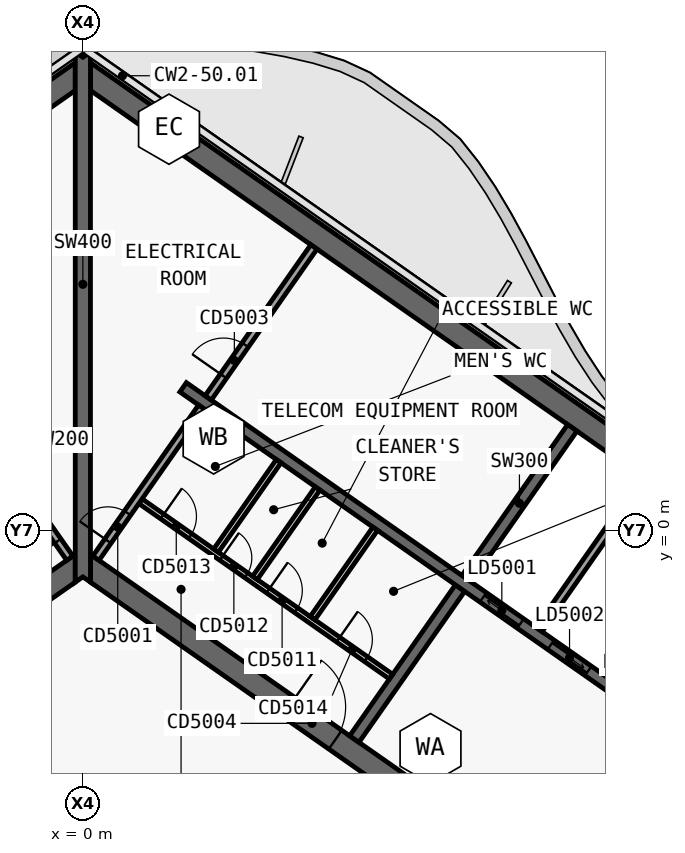
"""IFC4 building model, lengths in metres.
Left out: names, types, materials, properties, quantities, classifications, styles, units other than length and angle.
Written with IfcOpenShell. Run it as: python <this file> out.ifc"""

import sys

from ifc_helpers import new_model, si_unit, direction, frame, frame_2d, origin, place, context, subcontext, project, spatial, polyline, rectangle, outline, extrude, element, fill, save


model = new_model("IFC4")
c1 = context("Model", 3, precision=1e-05, world=origin(), true_north=direction((0.0, 1.0)))
c2 = subcontext(c1, "Body", "Model", "MODEL_VIEW")
j1 = project(units=[si_unit("LENGTHUNIT", "METRE"), si_unit("PLANEANGLEUNIT", "RADIAN")], contexts=[c1])
p1 = place(None, origin())
s1 = spatial("IfcSite", under=j1, at=p1, CompositionType="ELEMENT")
p2 = place(p1, origin())
s2 = spatial("IfcBuilding", under=s1, at=p2, CompositionType="ELEMENT")
p3 = place(p2, frame((0.0, 0.0, 276.1)))
s3 = spatial("IfcBuildingStorey", under=s2, at=p3, CompositionType="ELEMENT", Elevation=276.1)
p4 = place(p3, frame((-0.028, 12.066, 0.0), z_axis=(0.0, 0.0, 1.0), x_axis=(-0.819151382952, -0.573577380837, 0.0)))
e1 = element("IfcWall", 1, at=p4, inside=s3, PredefinedType="SHEAR", context=c2, shape_type="SweptSolid", body=[
    extrude(outline(polyline([(33.898, 0.3), (0.42, 0.3), (0.0, -0.3), (33.898, -0.3), (33.898, 0.3)])), origin(), (0.0, 0.0, 1.0), 3.9),
])
p5 = place(p3, frame((-0.028, -0.874, 0.0), z_axis=(0.0, 0.0, 1.0), x_axis=(-0.819150035022, -0.573579305871, 0.0)))
e2 = element("IfcWall", 2, at=p5, inside=s3, PredefinedType="SHEAR", context=c2, shape_type="SweptSolid", body=[
    extrude(outline(polyline([(26.476, 0.3), (0.42, 0.3), (0.0, -0.3), (26.476, -0.3), (26.476, 0.3)])), origin(), (0.0, 0.0, 1.0), 3.9),
])
p6 = place(p5, frame((2.976, 0.0, 0.0)))
e3 = element("IfcOpeningElement", 3, at=p6, cuts=e2, PredefinedType="OPENING", context=c2, shape_type="SweptSolid", body=[
    extrude(rectangle(XDim=2.4, YDim=2.1, at=frame_2d((1.2, 1.05))), frame((0.0, 0.31, 0.0), z_axis=(0.0, -1.0, 0.0), x_axis=(1.0, 0.0, 0.0)), (0.0, 0.0, 1.0), 0.62),
])
p7 = place(p5, frame((11.776, 0.0, 0.0)))
e4 = element("IfcOpeningElement", 4, at=p7, cuts=e2, PredefinedType="OPENING", context=c2, shape_type="SweptSolid", body=[
    extrude(rectangle(XDim=2.4, YDim=2.1, at=frame_2d((1.2, 1.05))), frame((0.0, 0.31, 0.0), z_axis=(0.0, -1.0, 0.0), x_axis=(1.0, 0.0, 0.0)), (0.0, 0.0, 1.0), 0.62),
])
p8 = place(p3, frame((0.028, 12.066, 0.0), z_axis=(0.0, 0.0, 1.0), x_axis=(0.819151382952, -0.573577380837, 0.0)))
e5 = element("IfcWall", 5, at=p8, inside=s3, PredefinedType="SHEAR", context=c2, shape_type="SweptSolid", body=[
    extrude(outline(polyline([(33.898, 0.3), (0.0, 0.3), (0.42, -0.3), (33.898, -0.3), (33.898, 0.3)])), origin(), (0.0, 0.0, 1.0), 3.9),
])
p9 = place(p3, frame((0.028, -0.874, 0.0), z_axis=(0.0, 0.0, 1.0), x_axis=(0.819150035022, -0.573579305871, 0.0)))
e6 = element("IfcWall", 6, at=p9, inside=s3, PredefinedType="SHEAR", context=c2, shape_type="SweptSolid", body=[
    extrude(outline(polyline([(26.476, 0.3), (0.0, 0.3), (0.42, -0.3), (26.476, -0.3), (26.476, 0.3)])), origin(), (0.0, 0.0, 1.0), 3.9),
])
p10 = place(p9, frame((6.576, 0.0, 0.0)))
e7 = element("IfcOpeningElement", 7, at=p10, cuts=e6, PredefinedType="OPENING", context=c2, shape_type="SweptSolid", body=[
    extrude(rectangle(XDim=1.5, YDim=2.1, at=frame_2d((0.75, 1.05))), frame((0.0, 0.31, 0.0), z_axis=(0.0, -1.0, 0.0), x_axis=(1.0, 0.0, 0.0)), (0.0, 0.0, 1.0), 0.62),
])
p11 = place(p9, frame((12.226, 0.0, 0.0)))
e8 = element("IfcOpeningElement", 8, at=p11, cuts=e6, PredefinedType="OPENING", context=c2, shape_type="SweptSolid", body=[
    extrude(rectangle(XDim=1.5, YDim=2.1, at=frame_2d((0.75, 1.05))), frame((0.0, 0.31, 0.0), z_axis=(0.0, -1.0, 0.0), x_axis=(1.0, 0.0, 0.0)), (0.0, 0.0, 1.0), 0.62),
])
p12 = place(p3, frame((7.143, -5.49, 0.0), z_axis=(0.0, 0.0, 1.0), x_axis=(0.573617744349, 0.819123118565, 0.0)))
e9 = element("IfcWall", 9, at=p12, inside=s3, PredefinedType="SHEAR", context=c2, shape_type="SweptSolid", body=[
    extrude(outline(polyline([(0.0, 0.15), (0.0, -0.15), (4.85, -0.15), (4.85, 0.15), (0.0, 0.15)])), origin(), (0.0, 0.0, 1.0), 3.9),
])
p13 = place(p3, frame((10.097, -1.271, 0.0), z_axis=(0.0, 0.0, 1.0), x_axis=(0.573560315113, 0.819163332265, 0.0)))
e10 = element("IfcWall", 10, at=p13, inside=s3, PredefinedType="SHEAR", context=c2, shape_type="SweptSolid", body=[
    extrude(outline(polyline([(4.85, -0.15), (4.85, 0.15), (0.0, 0.15), (0.0, -0.15), (4.85, -0.15)])), origin(), (0.0, 0.0, 1.0), 3.9),
])
p14 = place(p3, frame((2.638, 3.768, 0.0), z_axis=(0.0, 0.0, 1.0), x_axis=(0.819155014212, -0.573572194837, 0.0)))
e11 = element("IfcWall", 11, at=p14, inside=s3, PredefinedType="SHEAR", context=c2, shape_type="SweptSolid", body=[
    extrude(outline(polyline([(0.0, 0.15), (0.0, -0.15), (26.4, -0.15), (26.4, 0.15), (0.0, 0.15)])), origin(), (0.0, 0.0, 1.0), 3.9),
])
p15 = place(p14, frame((9.637, 0.0, 0.0)))
e12 = element("IfcOpeningElement", 12, at=p15, cuts=e11, PredefinedType="OPENING", context=c2, shape_type="SweptSolid", body=[
    extrude(rectangle(XDim=1.2, YDim=2.1, at=frame_2d((0.6, 1.05))), frame((0.0, 0.16, 0.0), z_axis=(0.0, -1.0, 0.0), x_axis=(1.0, 0.0, 0.0)), (0.0, 0.0, 1.0), 0.32),
])
p16 = place(p14, frame((11.812, 0.0, 0.0)))
e13 = element("IfcOpeningElement", 13, at=p16, cuts=e11, PredefinedType="OPENING", context=c2, shape_type="SweptSolid", body=[
    extrude(rectangle(XDim=1.2, YDim=2.1, at=frame_2d((0.6, 1.05))), frame((0.0, 0.16, 0.0), z_axis=(0.0, -1.0, 0.0), x_axis=(1.0, 0.0, 0.0)), (0.0, 0.0, 1.0), 0.32),
])
p17 = place(p14, frame((13.988, 0.0, 0.0)))
e14 = element("IfcOpeningElement", 14, at=p17, cuts=e11, PredefinedType="OPENING", context=c2, shape_type="SweptSolid", body=[
    extrude(rectangle(XDim=1.2, YDim=2.1, at=frame_2d((0.6, 1.05))), frame((0.0, 0.16, 0.0), z_axis=(0.0, -1.0, 0.0), x_axis=(1.0, 0.0, 0.0)), (0.0, 0.0, 1.0), 0.32),
])
p18 = place(p14, frame((16.262, 0.0, 0.0)))
e15 = element("IfcOpeningElement", 15, at=p18, cuts=e11, PredefinedType="OPENING", context=c2, shape_type="SweptSolid", body=[
    extrude(rectangle(XDim=1.0, YDim=2.1, at=frame_2d((0.5, 1.05))), frame((0.0, 0.16, 0.0), z_axis=(0.0, -1.0, 0.0), x_axis=(1.0, 0.0, 0.0)), (0.0, 0.0, 1.0), 0.32),
])
p19 = place(p3, frame((0.0, -1.361, 0.0), z_axis=(0.0, 0.0, 1.0), x_axis=(0.0, 1.0, 0.0)))
e16 = element("IfcWall", 16, at=p19, inside=s3, PredefinedType="SHEAR", context=c2, shape_type="SweptSolid", body=[
    extrude(outline(polyline([(0.14, 0.2), (0.0, 0.2), (0.14, 0.0), (0.0, -0.2), (0.14, -0.2), (1.012, -0.2), (12.94, -0.2), (13.813, -0.2), (13.893, -0.2), (13.933, -0.172), (13.813, 0.0), (13.933, 0.172), (13.893, 0.2), (13.813, 0.2), (12.94, 0.2), (1.012, 0.2), (0.14, 0.2)])), origin(), (0.0, 0.0, 1.0), 3.9),
])
p20 = place(p3, frame((12.001, -2.605, 0.0), z_axis=(0.0, 0.0, 1.0), x_axis=(0.573560315113, 0.819163332265, 0.0)))
e17 = element("IfcWall", 17, at=p20, inside=s3, PredefinedType="SOLIDWALL", context=c2, shape_type="SweptSolid", body=[
    extrude(rectangle(XDim=4.85, YDim=0.2, at=frame_2d((2.425, 0.0))), origin(), (0.0, 0.0, 1.0), 3.9),
])
p21 = place(p3, frame((13.783, -3.852, 0.0), z_axis=(0.0, 0.0, 1.0), x_axis=(0.573594092424, 0.81913968109, 0.0)))
e18 = element("IfcWall", 18, at=p21, inside=s3, PredefinedType="SOLIDWALL", context=c2, shape_type="SweptSolid", body=[
    extrude(rectangle(XDim=4.85, YDim=0.2, at=frame_2d((2.425, 0.0))), origin(), (0.0, 0.0, 1.0), 3.9),
])
p22 = place(p3, frame((1.516, 0.77, 0.0), z_axis=(0.0, 0.0, 1.0), x_axis=(0.819146424436, -0.573584462249, 0.0)))
e19 = element("IfcWall", 19, at=p22, inside=s3, PredefinedType="PARTITIONING", context=c2, shape_type="SweptSolid", body=[
    extrude(rectangle(XDim=8.05, YDim=0.15, at=frame_2d((4.025, 0.0))), origin(), (0.0, 0.0, 1.0), 3.62),
])
p23 = place(p22, frame((0.7, 0.0, 0.0)))
e20 = element("IfcOpeningElement", 20, at=p23, cuts=e19, PredefinedType="OPENING", context=c2, shape_type="SweptSolid", body=[
    extrude(rectangle(XDim=0.9, YDim=2.1, at=frame_2d((0.45, 1.05))), frame((0.0, 0.085, 0.0), z_axis=(0.0, -1.0, 0.0), x_axis=(1.0, 0.0, 0.0)), (0.0, 0.0, 1.0), 0.17),
])
p24 = place(p22, frame((2.6, 0.0, 0.0)))
e21 = element("IfcOpeningElement", 21, at=p24, cuts=e19, PredefinedType="OPENING", context=c2, shape_type="SweptSolid", body=[
    extrude(rectangle(XDim=0.8, YDim=2.1, at=frame_2d((0.4, 1.05))), frame((0.0, 0.085, 0.0), z_axis=(0.0, -1.0, 0.0), x_axis=(1.0, 0.0, 0.0)), (0.0, 0.0, 1.0), 0.17),
])
p25 = place(p22, frame((4.1, 0.0, 0.0)))
e22 = element("IfcOpeningElement", 22, at=p25, cuts=e19, PredefinedType="OPENING", context=c2, shape_type="SweptSolid", body=[
    extrude(rectangle(XDim=0.9, YDim=2.1, at=frame_2d((0.45, 1.05))), frame((0.0, 0.085, 0.0), z_axis=(0.0, -1.0, 0.0), x_axis=(1.0, 0.0, 0.0)), (0.0, 0.0, 1.0), 0.17),
])
p26 = place(p22, frame((6.35, 0.0, 0.0)))
e23 = element("IfcOpeningElement", 23, at=p26, cuts=e19, PredefinedType="OPENING", context=c2, shape_type="SweptSolid", body=[
    extrude(rectangle(XDim=0.9, YDim=2.1, at=frame_2d((0.45, 1.05))), frame((0.0, 0.085, 0.0), z_axis=(0.0, -1.0, 0.0), x_axis=(1.0, 0.0, 0.0)), (0.0, 0.0, 1.0), 0.17),
])
p27 = place(p3, frame((3.504, -0.531, 0.0), z_axis=(0.0, 0.0, 1.0), x_axis=(0.573582013179, 0.819148139324, 0.0)))
e24 = element("IfcWall", 24, at=p27, inside=s3, PredefinedType="PARTITIONING", context=c2, shape_type="SweptSolid", body=[
    extrude(rectangle(XDim=2.875, YDim=0.15, at=frame_2d((1.438, 0.0))), origin(), (0.0, 0.0, 1.0), 3.62),
])
p28 = place(p3, frame((4.528, -1.248, 0.0), z_axis=(0.0, 0.0, 1.0), x_axis=(0.573621911162, 0.819120200602, 0.0)))
e25 = element("IfcWall", 25, at=p28, inside=s3, PredefinedType="PARTITIONING", context=c2, shape_type="SweptSolid", body=[
    extrude(rectangle(XDim=2.875, YDim=0.15, at=frame_2d((1.438, 0.0))), origin(), (0.0, 0.0, 1.0), 3.62),
])
p29 = place(p3, frame((6.044, -2.309, 0.0), z_axis=(0.0, 0.0, 1.0), x_axis=(0.573564930514, 0.819160100642, 0.0)))
e26 = element("IfcWall", 26, at=p29, inside=s3, PredefinedType="PARTITIONING", context=c2, shape_type="SweptSolid", body=[
    extrude(rectangle(XDim=2.875, YDim=0.15, at=frame_2d((1.438, 0.0))), origin(), (0.0, 0.0, 1.0), 3.62),
])
p30 = place(p3, frame((-0.344, -0.729, 0.0), z_axis=(0.0, 0.0, 1.0), x_axis=(-0.573560315113, 0.819163332265, 0.0)))
e27 = element("IfcWall", 27, at=p30, inside=s3, PredefinedType="SOLIDWALL", context=c2, shape_type="SweptSolid", body=[
    extrude(rectangle(XDim=4.85, YDim=0.2, at=frame_2d((2.425, 0.0))), origin(), (0.0, 0.0, 1.0), 3.62),
])
p31 = place(p30, frame((0.55, 0.0, 0.0)))
e28 = element("IfcOpeningElement", 28, at=p31, cuts=e27, PredefinedType="OPENING", context=c2, shape_type="SweptSolid", body=[
    extrude(rectangle(XDim=0.9, YDim=2.1, at=frame_2d((0.45, 1.05))), frame((0.0, 0.11, 0.0), z_axis=(0.0, -1.0, 0.0), x_axis=(1.0, 0.0, 0.0)), (0.0, 0.0, 1.0), 0.22),
])
p32 = place(p3, frame((0.344, -0.729, 0.0), z_axis=(0.0, 0.0, 1.0), x_axis=(0.573560315113, 0.819163332265, 0.0)))
e29 = element("IfcWall", 29, at=p32, inside=s3, PredefinedType="SOLIDWALL", context=c2, shape_type="SweptSolid", body=[
    extrude(rectangle(XDim=4.85, YDim=0.2, at=frame_2d((2.425, 0.0))), origin(), (0.0, 0.0, 1.0), 3.62),
])
p33 = place(p32, frame((0.55, 0.0, 0.0)))
e30 = element("IfcOpeningElement", 30, at=p33, cuts=e29, PredefinedType="OPENING", context=c2, shape_type="SweptSolid", body=[
    extrude(rectangle(XDim=0.9, YDim=2.1, at=frame_2d((0.45, 1.05))), frame((0.0, 0.11, 0.0), z_axis=(0.0, -1.0, 0.0), x_axis=(1.0, 0.0, 0.0)), (0.0, 0.0, 1.0), 0.22),
])
p34 = place(p3, frame((3.298, 3.49, 0.0), z_axis=(0.0, 0.0, 1.0), x_axis=(0.573560315113, 0.819163332265, 0.0)))
e31 = element("IfcWall", 31, at=p34, inside=s3, PredefinedType="SOLIDWALL", context=c2, shape_type="SweptSolid", body=[
    extrude(rectangle(XDim=4.85, YDim=0.2, at=frame_2d((2.425, 0.0))), origin(), (0.0, 0.0, 1.0), 3.62),
])
p35 = place(p34, frame((0.7, 0.0, 0.0)))
e32 = element("IfcOpeningElement", 32, at=p35, cuts=e31, PredefinedType="OPENING", context=c2, shape_type="SweptSolid", body=[
    extrude(rectangle(XDim=1.0, YDim=2.1, at=frame_2d((0.5, 1.05))), frame((0.0, 0.11, 0.0), z_axis=(0.0, -1.0, 0.0), x_axis=(1.0, 0.0, 0.0)), (0.0, 0.0, 1.0), 0.22),
])
p36 = place(p15, origin())
e33 = element("IfcDoor", 33, at=p36, inside=s3, OperationType="SLIDING_TO_LEFT", PredefinedType="DOOR", context=c2, shape_type="SweptSolid", body=[
    extrude(rectangle(XDim=1.2, YDim=2.1, at=frame_2d((0.6, 1.05))), frame((0.0, 0.025, 0.0), z_axis=(0.0, -1.0, 0.0), x_axis=(1.0, 0.0, 0.0)), (0.0, 0.0, 1.0), 0.05),
])
fill(e12, e33)
p37 = place(p16, origin())
e34 = element("IfcDoor", 34, at=p37, inside=s3, OperationType="SLIDING_TO_RIGHT", PredefinedType="DOOR", context=c2, shape_type="SweptSolid", body=[
    extrude(rectangle(XDim=1.2, YDim=2.1, at=frame_2d((0.6, 1.05))), frame((0.0, 0.025, 0.0), z_axis=(0.0, -1.0, 0.0), x_axis=(1.0, 0.0, 0.0)), (0.0, 0.0, 1.0), 0.05),
])
fill(e13, e34)
p38 = place(p23, origin())
e35 = element("IfcDoor", 35, at=p38, inside=s3, OperationType="SINGLE_SWING_RIGHT", PredefinedType="DOOR", context=c2, shape_type="SweptSolid", body=[
    extrude(rectangle(XDim=0.9, YDim=2.1, at=frame_2d((0.45, 1.05))), frame((0.0, 0.025, 0.0), z_axis=(0.0, -1.0, 0.0), x_axis=(1.0, 0.0, 0.0)), (0.0, 0.0, 1.0), 0.05),
])
fill(e20, e35)
p39 = place(p24, origin())
e36 = element("IfcDoor", 36, at=p39, inside=s3, OperationType="SINGLE_SWING_RIGHT", PredefinedType="DOOR", context=c2, shape_type="SweptSolid", body=[
    extrude(rectangle(XDim=0.8, YDim=2.1, at=frame_2d((0.4, 1.05))), frame((0.0, 0.025, 0.0), z_axis=(0.0, -1.0, 0.0), x_axis=(1.0, 0.0, 0.0)), (0.0, 0.0, 1.0), 0.05),
])
fill(e21, e36)
p40 = place(p25, origin())
e37 = element("IfcDoor", 37, at=p40, inside=s3, OperationType="SINGLE_SWING_RIGHT", PredefinedType="DOOR", context=c2, shape_type="SweptSolid", body=[
    extrude(rectangle(XDim=0.9, YDim=2.1, at=frame_2d((0.45, 1.05))), frame((0.0, 0.025, 0.0), z_axis=(0.0, -1.0, 0.0), x_axis=(1.0, 0.0, 0.0)), (0.0, 0.0, 1.0), 0.05),
])
fill(e22, e37)
p41 = place(p26, origin())
e38 = element("IfcDoor", 38, at=p41, inside=s3, OperationType="SINGLE_SWING_RIGHT", PredefinedType="DOOR", context=c2, shape_type="SweptSolid", body=[
    extrude(rectangle(XDim=0.9, YDim=2.1, at=frame_2d((0.45, 1.05))), frame((0.0, 0.025, 0.0), z_axis=(0.0, -1.0, 0.0), x_axis=(1.0, 0.0, 0.0)), (0.0, 0.0, 1.0), 0.05),
])
fill(e23, e38)
p42 = place(p10, origin())
e39 = element("IfcDoor", 39, at=p42, inside=s3, OperationType="SINGLE_SWING_RIGHT", PredefinedType="DOOR", context=c2, shape_type="SweptSolid", body=[
    extrude(rectangle(XDim=1.5, YDim=2.1, at=frame_2d((0.75, 1.05))), frame((0.0, 0.025, 0.0), z_axis=(0.0, -1.0, 0.0), x_axis=(1.0, 0.0, 0.0)), (0.0, 0.0, 1.0), 0.05),
])
fill(e7, e39)
p43 = place(p31, origin())
e40 = element("IfcDoor", 40, at=p43, inside=s3, OperationType="SINGLE_SWING_RIGHT", PredefinedType="DOOR", context=c2, shape_type="SweptSolid", body=[
    extrude(rectangle(XDim=0.9, YDim=2.1, at=frame_2d((0.45, 1.05))), frame((0.0, 0.025, 0.0), z_axis=(0.0, -1.0, 0.0), x_axis=(1.0, 0.0, 0.0)), (0.0, 0.0, 1.0), 0.05),
])
fill(e28, e40)
p44 = place(p33, origin())
e41 = element("IfcDoor", 41, at=p44, inside=s3, OperationType="SINGLE_SWING_RIGHT", PredefinedType="DOOR", context=c2, shape_type="SweptSolid", body=[
    extrude(rectangle(XDim=0.9, YDim=2.1, at=frame_2d((0.45, 1.05))), frame((0.0, 0.025, 0.0), z_axis=(0.0, -1.0, 0.0), x_axis=(1.0, 0.0, 0.0)), (0.0, 0.0, 1.0), 0.05),
])
fill(e30, e41)
p45 = place(p35, origin())
e42 = element("IfcDoor", 42, at=p45, inside=s3, OperationType="SINGLE_SWING_RIGHT", PredefinedType="DOOR", context=c2, shape_type="SweptSolid", body=[
    extrude(rectangle(XDim=1.0, YDim=2.1, at=frame_2d((0.5, 1.05))), frame((0.0, 0.025, 0.0), z_axis=(0.0, -1.0, 0.0), x_axis=(1.0, 0.0, 0.0)), (0.0, 0.0, 1.0), 0.05),
])
fill(e32, e42)
save(model, sys.argv[1])
